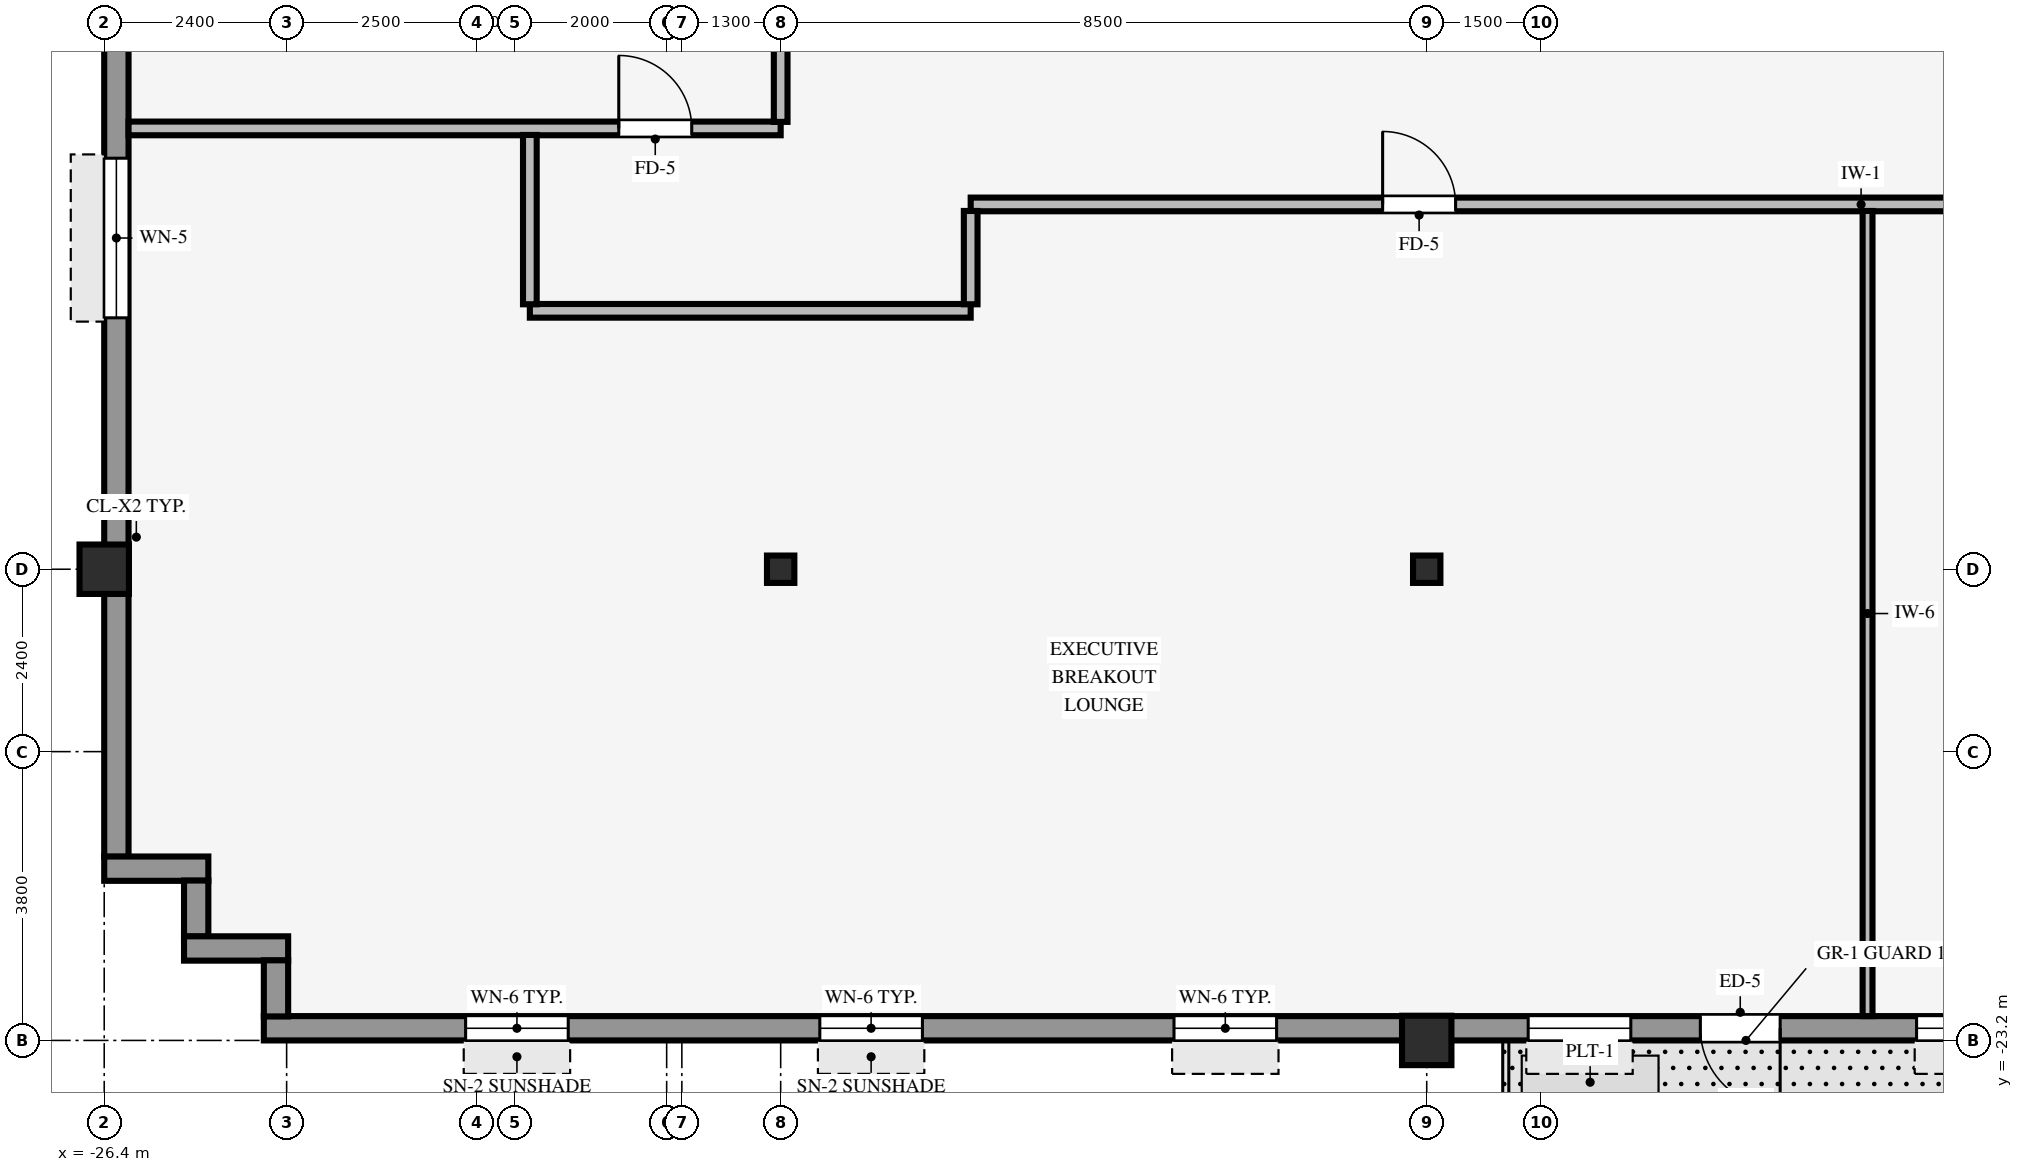
"""IFC4 building model, lengths in metres.
Left out: names, types, materials, properties, quantities, classifications, styles, units other than length and angle.
Written with IfcOpenShell. Run it as: python <this file> out.ifc"""

import sys

from ifc_helpers import new_model, si_unit, direction, frame, frame_2d, origin, origin_2d, place, context, subcontext, project, spatial, rectangle, hollow_rectangle, i_section, extrude, source, transform, mapped, element, fill, save


model = new_model("IFC4")
c1 = context("Model", 3, precision=1e-05, world=origin(), true_north=direction((0.0, 1.0)))
c2 = subcontext(c1, "Body", "Model", "MODEL_VIEW")
j1 = project(units=[si_unit("LENGTHUNIT", "METRE"), si_unit("PLANEANGLEUNIT", "RADIAN")], contexts=[c1])
p1 = place(None, origin())
s1 = spatial("IfcSite", under=j1, at=p1, CompositionType="ELEMENT")
p2 = place(p1, origin())
s2 = spatial("IfcBuilding", under=s1, at=p2, CompositionType="ELEMENT")
p3 = place(p2, frame((0.0, 0.0, 120.2)))
s3 = spatial("IfcBuildingStorey", under=s2, at=p3, CompositionType="ELEMENT", Elevation=120.2)
for number, where, z_axis, x_axis in (
    (1, (-26.4, -17.0, 0.0), (0.0, 0.0, 1.0), (1.0, 0.0, 0.0)),
    (2, (-9.0, -23.2, 0.0), (0.0, 0.0, 1.0), (1.0, 0.0, 0.0)),
):
    element("IfcColumn", number, at=place(p3, frame(where, z_axis=z_axis, x_axis=x_axis)), inside=s3, PredefinedType="COLUMN", context=c2, shape_type="SweptSolid", body=[
        extrude(hollow_rectangle(XDim=0.65, YDim=0.65, WallThickness=0.04, InnerFilletRadius=0.04, OuterFilletRadius=0.08, at=origin_2d()), origin(), (0.0, 0.0, 1.0), 3.37),
    ])
for number, where, z_axis, x_axis in (
    (3, (-17.5, -17.0, 0.0), (0.0, 0.0, 1.0), (1.0, 0.0, 0.0)),
    (4, (-9.0, -17.0, 0.0), (0.0, 0.0, 1.0), (1.0, 0.0, 0.0)),
):
    element("IfcColumn", number, at=place(p3, frame(where, z_axis=z_axis, x_axis=x_axis)), inside=s3, PredefinedType="COLUMN", context=c2, shape_type="SweptSolid", body=[
        extrude(i_section(OverallWidth=0.36, OverallDepth=0.36, WebThickness=0.021, FlangeThickness=0.021, FilletRadius=0.018, at=origin_2d()), origin(), (0.0, 0.0, 1.0), 3.37),
    ])
p4 = place(p3, frame((-24.3, -23.04, 0.0), z_axis=(0.0, 0.0, 1.0), x_axis=(1.0, 0.0, 0.0)))
e5 = element("IfcWall", 5, at=p4, inside=s3, PredefinedType="STANDARD", context=c2, shape_type="SweptSolid", body=[
    extrude(rectangle(XDim=48.6, YDim=0.32, at=frame_2d((24.3, 0.0))), origin(), (0.0, 0.0, 1.0), 2.705),
])
p5 = place(p4, frame((19.95, 0.0, 0.0), z_axis=(0.0, 0.0, 1.0), x_axis=(-1.0, 0.0, 0.0)))
e6 = element("IfcOpeningElement", 6, at=p5, cuts=e5, PredefinedType="OPENING", context=c2, shape_type="SweptSolid", body=[
    extrude(rectangle(XDim=1.05, YDim=2.1, at=frame_2d((0.525, 1.05))), frame((0.0, 0.17, 0.0), z_axis=(0.0, -1.0, 0.0), x_axis=(1.0, 0.0, 0.0)), (0.0, 0.0, 1.0), 0.34),
])
p6 = place(p4, frame((2.655, 0.0, 0.8)))
e7 = element("IfcOpeningElement", 7, at=p6, cuts=e5, PredefinedType="OPENING", context=c2, shape_type="SweptSolid", body=[
    extrude(rectangle(XDim=1.35, YDim=1.56, at=frame_2d((0.675, 0.78))), frame((0.0, 0.17, 0.0), z_axis=(0.0, -1.0, 0.0), x_axis=(1.0, 0.0, 0.0)), (0.0, 0.0, 1.0), 0.34),
])
p7 = place(p4, frame((7.315, 0.0, 0.8)))
e8 = element("IfcOpeningElement", 8, at=p7, cuts=e5, PredefinedType="OPENING", context=c2, shape_type="SweptSolid", body=[
    extrude(rectangle(XDim=1.35, YDim=1.56, at=frame_2d((0.675, 0.78))), frame((0.0, 0.17, 0.0), z_axis=(0.0, -1.0, 0.0), x_axis=(1.0, 0.0, 0.0)), (0.0, 0.0, 1.0), 0.34),
])
p8 = place(p4, frame((11.975, 0.0, 0.8)))
e9 = element("IfcOpeningElement", 9, at=p8, cuts=e5, PredefinedType="OPENING", context=c2, shape_type="SweptSolid", body=[
    extrude(rectangle(XDim=1.35, YDim=1.56, at=frame_2d((0.675, 0.78))), frame((0.0, 0.17, 0.0), z_axis=(0.0, -1.0, 0.0), x_axis=(1.0, 0.0, 0.0)), (0.0, 0.0, 1.0), 0.34),
])
p9 = place(p4, frame((16.635, 0.0, 0.8)))
e10 = element("IfcOpeningElement", 10, at=p9, cuts=e5, PredefinedType="OPENING", context=c2, shape_type="SweptSolid", body=[
    extrude(rectangle(XDim=1.35, YDim=1.56, at=frame_2d((0.675, 0.78))), frame((0.0, 0.17, 0.0), z_axis=(0.0, -1.0, 0.0), x_axis=(1.0, 0.0, 0.0)), (0.0, 0.0, 1.0), 0.34),
])
p10 = place(p4, frame((21.745, 0.0, 0.8)))
e11 = element("IfcOpeningElement", 11, at=p10, cuts=e5, PredefinedType="OPENING", context=c2, shape_type="SweptSolid", body=[
    extrude(rectangle(XDim=1.35, YDim=1.56, at=frame_2d((0.675, 0.78))), frame((0.0, 0.17, 0.0), z_axis=(0.0, -1.0, 0.0), x_axis=(1.0, 0.0, 0.0)), (0.0, 0.0, 1.0), 0.34),
])
p11 = place(p4, frame((25.955, 0.0, 0.8)))
e12 = element("IfcOpeningElement", 12, at=p11, cuts=e5, PredefinedType="OPENING", context=c2, shape_type="SweptSolid", body=[
    extrude(rectangle(XDim=1.35, YDim=1.56, at=frame_2d((0.675, 0.78))), frame((0.0, 0.17, 0.0), z_axis=(0.0, -1.0, 0.0), x_axis=(1.0, 0.0, 0.0)), (0.0, 0.0, 1.0), 0.34),
])
p12 = place(p4, frame((30.615, 0.0, 0.8)))
e13 = element("IfcOpeningElement", 13, at=p12, cuts=e5, PredefinedType="OPENING", context=c2, shape_type="SweptSolid", body=[
    extrude(rectangle(XDim=1.35, YDim=1.56, at=frame_2d((0.675, 0.78))), frame((0.0, 0.17, 0.0), z_axis=(0.0, -1.0, 0.0), x_axis=(1.0, 0.0, 0.0)), (0.0, 0.0, 1.0), 0.34),
])
p13 = place(p4, frame((35.275, 0.0, 0.8)))
e14 = element("IfcOpeningElement", 14, at=p13, cuts=e5, PredefinedType="OPENING", context=c2, shape_type="SweptSolid", body=[
    extrude(rectangle(XDim=1.35, YDim=1.56, at=frame_2d((0.675, 0.78))), frame((0.0, 0.17, 0.0), z_axis=(0.0, -1.0, 0.0), x_axis=(1.0, 0.0, 0.0)), (0.0, 0.0, 1.0), 0.34),
])
p14 = place(p4, frame((39.935, 0.0, 0.8)))
e15 = element("IfcOpeningElement", 15, at=p14, cuts=e5, PredefinedType="OPENING", context=c2, shape_type="SweptSolid", body=[
    extrude(rectangle(XDim=1.35, YDim=1.56, at=frame_2d((0.675, 0.78))), frame((0.0, 0.17, 0.0), z_axis=(0.0, -1.0, 0.0), x_axis=(1.0, 0.0, 0.0)), (0.0, 0.0, 1.0), 0.34),
])
p15 = place(p4, frame((44.595, 0.0, 0.8)))
e16 = element("IfcOpeningElement", 16, at=p15, cuts=e5, PredefinedType="OPENING", context=c2, shape_type="SweptSolid", body=[
    extrude(rectangle(XDim=1.35, YDim=1.56, at=frame_2d((0.675, 0.78))), frame((0.0, 0.17, 0.0), z_axis=(0.0, -1.0, 0.0), x_axis=(1.0, 0.0, 0.0)), (0.0, 0.0, 1.0), 0.34),
])
p16 = place(p3, frame((-26.24, -20.784, 0.0), z_axis=(0.0, 0.0, 1.0), x_axis=(0.0, 1.0, 0.0)))
e17 = element("IfcWall", 17, at=p16, inside=s3, PredefinedType="STANDARD", context=c2, shape_type="SweptSolid", body=[
    extrude(rectangle(XDim=17.184, YDim=0.32, at=frame_2d((8.592, 0.0))), origin(), (0.0, 0.0, 1.0), 2.705),
])
p17 = place(p16, frame((7.092, 0.0, 0.8)))
e18 = element("IfcOpeningElement", 18, at=p17, cuts=e17, PredefinedType="OPENING", context=c2, shape_type="SweptSolid", body=[
    extrude(rectangle(XDim=2.1, YDim=1.56, at=frame_2d((1.05, 0.78))), frame((0.0, 0.17, 0.0), z_axis=(0.0, -1.0, 0.0), x_axis=(1.0, 0.0, 0.0)), (0.0, 0.0, 1.0), 0.34),
])
p18 = place(p16, frame((12.603, 0.0, 0.8)))
e19 = element("IfcOpeningElement", 19, at=p18, cuts=e17, PredefinedType="OPENING", context=c2, shape_type="SweptSolid", body=[
    extrude(rectangle(XDim=2.1, YDim=1.56, at=frame_2d((1.05, 0.78))), frame((0.0, 0.17, 0.0), z_axis=(0.0, -1.0, 0.0), x_axis=(1.0, 0.0, 0.0)), (0.0, 0.0, 1.0), 0.34),
])
p19 = place(p3, frame((-26.4, -20.94, 0.0), z_axis=(0.0, 0.0, 1.0), x_axis=(1.0, 0.0, 0.0)))
e20 = element("IfcWall", 20, at=p19, inside=s3, PredefinedType="STANDARD", context=c2, shape_type="SweptSolid", body=[
    extrude(rectangle(XDim=1.37, YDim=0.32, at=frame_2d((0.685, 0.0))), origin(), (0.0, 0.0, 1.0), 3.36),
])
p20 = place(p3, frame((-25.19, -21.834, 0.0), z_axis=(0.0, 0.0, 1.0), x_axis=(0.0, 1.0, 0.0)))
e21 = element("IfcWall", 21, at=p20, inside=s3, PredefinedType="STANDARD", context=c2, shape_type="SweptSolid", body=[
    extrude(rectangle(XDim=0.738, YDim=0.32, at=frame_2d((0.369, 0.0))), origin(), (0.0, 0.0, 1.0), 3.36),
])
p21 = place(p3, frame((-25.35, -21.99, 0.0), z_axis=(0.0, 0.0, 1.0), x_axis=(1.0, 0.0, 0.0)))
e22 = element("IfcWall", 22, at=p21, inside=s3, PredefinedType="STANDARD", context=c2, shape_type="SweptSolid", body=[
    extrude(rectangle(XDim=1.37, YDim=0.32, at=frame_2d((0.685, 0.0))), origin(), (0.0, 0.0, 1.0), 3.36),
])
p22 = place(p3, frame((-24.14, -22.884, 0.0), z_axis=(0.0, 0.0, 1.0), x_axis=(0.0, 1.0, 0.0)))
e23 = element("IfcWall", 23, at=p22, inside=s3, PredefinedType="STANDARD", context=c2, shape_type="SweptSolid", body=[
    extrude(rectangle(XDim=0.738, YDim=0.32, at=frame_2d((0.369, 0.0))), origin(), (0.0, 0.0, 1.0), 3.36),
])
p23 = place(p3, frame((-20.8, -13.6, 0.0), z_axis=(0.0, 0.0, 1.0), x_axis=(1.0, 0.0, 0.0)))
e24 = element("IfcWall", 24, at=p23, inside=s3, PredefinedType="PARTITIONING", context=c2, shape_type="SweptSolid", body=[
    extrude(rectangle(XDim=5.8, YDim=0.18, at=frame_2d((2.9, 0.0))), origin(), (0.0, 0.0, 1.0), 2.998),
])
p24 = place(p3, frame((-15.0, -12.2, 0.0), z_axis=(0.0, 0.0, 1.0), x_axis=(1.0, 0.0, 0.0)))
e25 = element("IfcWall", 25, at=p24, inside=s3, PredefinedType="PARTITIONING", context=c2, shape_type="SweptSolid", body=[
    extrude(rectangle(XDim=30.0, YDim=0.18, at=frame_2d((15.0, 0.0))), origin(), (0.0, 0.0, 1.0), 3.36),
])
p25 = place(p24, frame((5.42, 0.0, 0.0)))
e26 = element("IfcOpeningElement", 26, at=p25, cuts=e25, PredefinedType="OPENING", context=c2, shape_type="SweptSolid", body=[
    extrude(rectangle(XDim=0.96, YDim=2.1, at=frame_2d((0.48, 1.05))), frame((0.0, 0.1, 0.0), z_axis=(0.0, -1.0, 0.0), x_axis=(1.0, 0.0, 0.0)), (0.0, 0.0, 1.0), 0.2),
])
p26 = place(p24, frame((26.42, 0.0, 0.0)))
e27 = element("IfcOpeningElement", 27, at=p26, cuts=e25, PredefinedType="OPENING", context=c2, shape_type="SweptSolid", body=[
    extrude(rectangle(XDim=0.96, YDim=2.1, at=frame_2d((0.48, 1.05))), frame((0.0, 0.1, 0.0), z_axis=(0.0, -1.0, 0.0), x_axis=(1.0, 0.0, 0.0)), (0.0, 0.0, 1.0), 0.2),
])
p27 = place(p24, frame((19.65, 0.0, 0.0)))
e28 = element("IfcOpeningElement", 28, at=p27, cuts=e25, PredefinedType="OPENING", context=c2, shape_type="SweptSolid", body=[
    extrude(rectangle(XDim=0.9, YDim=2.1, at=frame_2d((0.45, 1.05))), frame((0.0, 0.1, 0.0), z_axis=(0.0, -1.0, 0.0), x_axis=(1.0, 0.0, 0.0)), (0.0, 0.0, 1.0), 0.2),
])
p28 = place(p24, frame((17.05, 0.0, 0.0)))
e29 = element("IfcOpeningElement", 29, at=p28, cuts=e25, PredefinedType="OPENING", context=c2, shape_type="SweptSolid", body=[
    extrude(rectangle(XDim=0.9, YDim=2.1, at=frame_2d((0.45, 1.05))), frame((0.0, 0.1, 0.0), z_axis=(0.0, -1.0, 0.0), x_axis=(1.0, 0.0, 0.0)), (0.0, 0.0, 1.0), 0.2),
])
p29 = place(p24, frame((22.15, 0.0, 0.0)))
e30 = element("IfcOpeningElement", 30, at=p29, cuts=e25, PredefinedType="OPENING", context=c2, shape_type="SweptSolid", body=[
    extrude(rectangle(XDim=0.9, YDim=2.1, at=frame_2d((0.45, 1.05))), frame((0.0, 0.1, 0.0), z_axis=(0.0, -1.0, 0.0), x_axis=(1.0, 0.0, 0.0)), (0.0, 0.0, 1.0), 0.2),
])
p30 = place(p3, frame((-26.08, -11.2, 0.0), z_axis=(0.0, 0.0, 1.0), x_axis=(1.0, 0.0, 0.0)))
e31 = element("IfcWall", 31, at=p30, inside=s3, PredefinedType="PARTITIONING", context=c2, shape_type="SweptSolid", body=[
    extrude(rectangle(XDim=8.58, YDim=0.18, at=frame_2d((4.29, 0.0))), origin(), (0.0, 0.0, 1.0), 3.36),
])
p31 = place(p30, frame((6.45, 0.0, 0.0)))
e32 = element("IfcOpeningElement", 32, at=p31, cuts=e31, PredefinedType="OPENING", context=c2, shape_type="SweptSolid", body=[
    extrude(rectangle(XDim=0.96, YDim=2.1, at=frame_2d((0.48, 1.05))), frame((0.0, 0.1, 0.0), z_axis=(0.0, -1.0, 0.0), x_axis=(1.0, 0.0, 0.0)), (0.0, 0.0, 1.0), 0.2),
])
p32 = place(p3, frame((-20.8, -13.514, 0.0), z_axis=(0.0, 0.0, 1.0), x_axis=(0.0, 1.0, 0.0)))
e33 = element("IfcWall", 33, at=p32, inside=s3, PredefinedType="PARTITIONING", context=c2, shape_type="SweptSolid", body=[
    extrude(rectangle(XDim=2.228, YDim=0.18, at=frame_2d((1.114, 0.0))), origin(), (0.0, 0.0, 1.0), 3.36),
])
p33 = place(p3, frame((-17.5, -11.114, 0.0), z_axis=(0.0, 0.0, 1.0), x_axis=(0.0, 1.0, 0.0)))
e34 = element("IfcWall", 34, at=p33, inside=s3, PredefinedType="PARTITIONING", context=c2, shape_type="SweptSolid", body=[
    extrude(rectangle(XDim=0.968, YDim=0.18, at=frame_2d((0.484, 0.0))), origin(), (0.0, 0.0, 1.0), 2.816),
])
p34 = place(p3, frame((-15.0, -13.514, 0.0), z_axis=(0.0, 0.0, 1.0), x_axis=(0.0, 1.0, 0.0)))
e35 = element("IfcWall", 35, at=p34, inside=s3, PredefinedType="PARTITIONING", context=c2, shape_type="SweptSolid", body=[
    extrude(rectangle(XDim=1.228, YDim=0.18, at=frame_2d((0.614, 0.0))), origin(), (0.0, 0.0, 1.0), 3.36),
])
p35 = place(p3, frame((-3.2, -22.88, 0.0), z_axis=(0.0, 0.0, 1.0), x_axis=(0.0, 1.0, 0.0)))
e36 = element("IfcWall", 36, at=p35, inside=s3, PredefinedType="PARTITIONING", context=c2, shape_type="SweptSolid", body=[
    extrude(rectangle(XDim=10.594, YDim=0.13, at=frame_2d((5.297, 0.0))), origin(), (0.0, 0.0, 1.0), 3.36),
])
m1 = source(origin(), c2, "Body", "SweptSolid", [
    extrude(rectangle(XDim=1.05, YDim=2.1, at=frame_2d((0.525, 1.05))), frame((0.0, 0.025, 0.0), z_axis=(0.0, -1.0, 0.0), x_axis=(1.0, 0.0, 0.0)), (0.0, 0.0, 1.0), 0.05),
])
p36 = place(p5, origin())
e37 = element("IfcDoor", 37, at=p36, inside=s3, OperationType="SINGLE_SWING_LEFT", PredefinedType="DOOR", context=c2, shape_type="MappedRepresentation", body=[
    mapped(m1, transform((0.0, 0.0, 0.0), scale=1.0)),
])
fill(e6, e37)
m2 = source(origin(), c2, "Body", "SweptSolid", [
    extrude(rectangle(XDim=1.35, YDim=1.56, at=frame_2d((0.675, 0.78))), frame((0.0, 0.03, 0.0), z_axis=(0.0, -1.0, 0.0), x_axis=(1.0, 0.0, 0.0)), (0.0, 0.0, 1.0), 0.06),
])
p37 = place(p6, origin())
e38 = element("IfcWindow", 38, at=p37, inside=s3, PartitioningType="SINGLE_PANEL", PredefinedType="WINDOW", context=c2, shape_type="MappedRepresentation", body=[
    mapped(m2, transform((0.0, 0.0, 0.0), scale=1.0)),
])
fill(e7, e38)
p38 = place(p7, origin())
e39 = element("IfcWindow", 39, at=p38, inside=s3, PartitioningType="SINGLE_PANEL", PredefinedType="WINDOW", context=c2, shape_type="MappedRepresentation", body=[
    mapped(m2, transform((0.0, 0.0, 0.0), scale=1.0)),
])
fill(e8, e39)
p39 = place(p8, origin())
e40 = element("IfcWindow", 40, at=p39, inside=s3, PartitioningType="SINGLE_PANEL", PredefinedType="WINDOW", context=c2, shape_type="MappedRepresentation", body=[
    mapped(m2, transform((0.0, 0.0, 0.0), scale=1.0)),
])
fill(e9, e40)
p40 = place(p9, origin())
e41 = element("IfcWindow", 41, at=p40, inside=s3, PartitioningType="SINGLE_PANEL", PredefinedType="WINDOW", context=c2, shape_type="MappedRepresentation", body=[
    mapped(m2, transform((0.0, 0.0, 0.0), scale=1.0)),
])
fill(e10, e41)
p41 = place(p10, origin())
e42 = element("IfcWindow", 42, at=p41, inside=s3, PartitioningType="SINGLE_PANEL", PredefinedType="WINDOW", context=c2, shape_type="MappedRepresentation", body=[
    mapped(m2, transform((0.0, 0.0, 0.0), scale=1.0)),
])
fill(e11, e42)
m3 = source(origin(), c2, "Body", "SweptSolid", [
    extrude(rectangle(XDim=2.1, YDim=1.56, at=frame_2d((1.05, 0.78))), frame((0.0, 0.03, 0.0), z_axis=(0.0, -1.0, 0.0), x_axis=(1.0, 0.0, 0.0)), (0.0, 0.0, 1.0), 0.06),
])
p42 = place(p17, origin())
e43 = element("IfcWindow", 43, at=p42, inside=s3, PartitioningType="SINGLE_PANEL", PredefinedType="WINDOW", context=c2, shape_type="MappedRepresentation", body=[
    mapped(m3, transform((0.0, 0.0, 0.0), scale=1.0)),
])
fill(e18, e43)
m4 = source(origin(), c2, "Body", "SweptSolid", [
    extrude(rectangle(XDim=0.96, YDim=2.1, at=frame_2d((0.48, 1.05))), frame((0.0, 0.025, 0.0), z_axis=(0.0, -1.0, 0.0), x_axis=(1.0, 0.0, 0.0)), (0.0, 0.0, 1.0), 0.05),
])
p43 = place(p25, origin())
e44 = element("IfcDoor", 44, at=p43, inside=s3, OperationType="SINGLE_SWING_LEFT", PredefinedType="DOOR", context=c2, shape_type="MappedRepresentation", body=[
    mapped(m4, transform((0.0, 0.0, 0.0), scale=1.0)),
])
fill(e26, e44)
p44 = place(p31, origin())
e45 = element("IfcDoor", 45, at=p44, inside=s3, OperationType="SINGLE_SWING_LEFT", PredefinedType="DOOR", context=c2, shape_type="MappedRepresentation", body=[
    mapped(m4, transform((0.0, 0.0, 0.0), scale=1.0)),
])
fill(e32, e45)
save(model, sys.argv[1])
